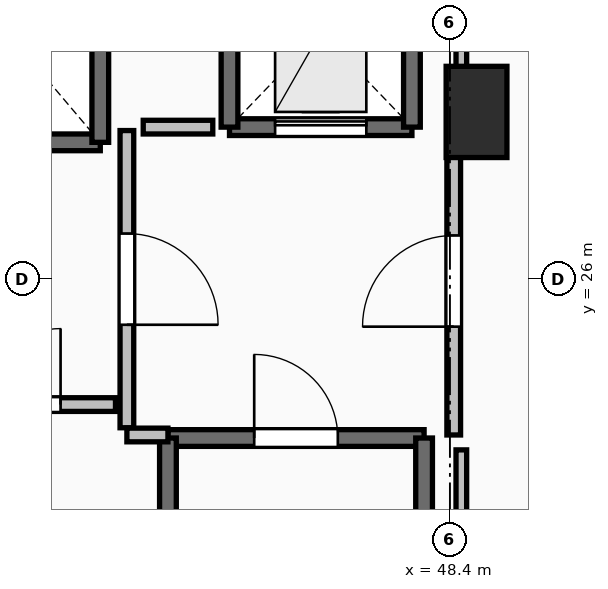
"""IFC4 building model, lengths in metres.
Left out: names, types, materials, properties, quantities, classifications, styles, units other than length and angle.
Written with IfcOpenShell. Run it as: python <this file> out.ifc"""

import sys

from ifc_helpers import new_model, si_unit, direction, frame, frame_2d, origin, origin_2d, place, context, subcontext, project, spatial, rectangle, extrude, element, fill, save


model = new_model("IFC4")
c1 = context("Model", 3, precision=1e-05, world=origin(), true_north=direction((0.0, 1.0)))
c2 = subcontext(c1, "Body", "Model", "MODEL_VIEW")
j1 = project(units=[si_unit("LENGTHUNIT", "METRE"), si_unit("PLANEANGLEUNIT", "RADIAN")], contexts=[c1])
p1 = place(None, origin())
s1 = spatial("IfcSite", under=j1, at=p1, CompositionType="ELEMENT")
p2 = place(p1, origin())
s2 = spatial("IfcBuilding", under=s1, at=p2, CompositionType="ELEMENT")
p3 = place(p2, frame((0.0, 0.0, 129.1)))
s3 = spatial("IfcBuildingStorey", under=s2, at=p3, CompositionType="ELEMENT", Elevation=129.1)
p4 = place(p3, frame((48.75, 28.2, 0.0), z_axis=(0.0, 0.0, 1.0), x_axis=(1.0, 0.0, 0.0)))
e1 = element("IfcColumn", 1, at=p4, inside=s3, PredefinedType="PILASTER", context=c2, shape_type="SweptSolid", body=[
    extrude(rectangle(XDim=0.8, YDim=1.2, at=origin_2d()), origin(), (0.0, 0.0, 1.0), 3.5),
])
p5 = place(p3, frame((44.69, 23.91, 0.0), z_axis=(0.0, 0.0, 1.0), x_axis=(1.0, 0.0, 0.0)))
e2 = element("IfcWall", 2, at=p5, inside=s3, PredefinedType="SOLIDWALL", context=c2, shape_type="SweptSolid", body=[
    extrude(rectangle(XDim=3.37, YDim=0.22, at=frame_2d((1.685, 0.0))), origin(), (0.0, 0.0, 1.0), 3.24),
])
p6 = place(p5, frame((1.135, 0.0, 0.0)))
e3 = element("IfcOpeningElement", 3, at=p6, cuts=e2, PredefinedType="OPENING", context=c2, shape_type="SweptSolid", body=[
    extrude(rectangle(XDim=1.1, YDim=2.15, at=frame_2d((0.55, 1.075))), frame((0.0, 0.125, 0.0), z_axis=(0.0, -1.0, 0.0), x_axis=(1.0, 0.0, 0.0)), (0.0, 0.0, 1.0), 0.25),
])
for number, where, z_axis, x_axis in (
    (4, (48.06, 23.91, 0.0), (0.0, 0.0, 1.0), (0.0, -1.0, 0.0)),
    (5, (44.69, 16.49, 0.0), (0.0, 0.0, 1.0), (0.0, 1.0, 0.0)),
):
    element("IfcWall", number, at=place(p3, frame(where, z_axis=z_axis, x_axis=x_axis)), inside=s3, PredefinedType="SOLIDWALL", context=c2, shape_type="SweptSolid", body=[
        extrude(rectangle(XDim=7.42, YDim=0.22, at=frame_2d((3.71, 0.0))), origin(), (0.0, 0.0, 1.0), 3.24),
    ])
p7 = place(p3, frame((41.6, 27.8, 0.0), z_axis=(0.0, 0.0, 1.0), x_axis=(1.0, 0.0, 0.0)))
e6 = element("IfcWall", 6, at=p7, inside=s3, PredefinedType="SOLIDWALL", context=c2, shape_type="SweptSolid", body=[
    extrude(rectangle(XDim=2.2, YDim=0.22, at=frame_2d((1.1, 0.0))), origin(), (0.0, 0.0, 1.0), 3.24),
])
p8 = place(p3, frame((43.8, 27.8, 0.0), z_axis=(0.0, 0.0, 1.0), x_axis=(0.0, 1.0, 0.0)))
e7 = element("IfcWall", 7, at=p8, inside=s3, PredefinedType="SOLIDWALL", context=c2, shape_type="SweptSolid", body=[
    extrude(rectangle(XDim=2.6, YDim=0.22, at=frame_2d((1.3, 0.0))), origin(), (0.0, 0.0, 1.0), 3.24),
])
p9 = place(p3, frame((45.5, 28.0, 0.0), z_axis=(0.0, 0.0, 1.0), x_axis=(1.0, 0.0, 0.0)))
e8 = element("IfcWall", 8, at=p9, inside=s3, PredefinedType="SHEAR", context=c2, shape_type="SweptSolid", body=[
    extrude(rectangle(XDim=2.4, YDim=0.22, at=frame_2d((1.2, 0.0))), origin(), (0.0, 0.0, 1.0), 3.24),
])
p10 = place(p9, frame((0.6, 0.0, 0.0)))
e9 = element("IfcOpeningElement", 9, at=p10, cuts=e8, PredefinedType="OPENING", context=c2, shape_type="SweptSolid", body=[
    extrude(rectangle(XDim=1.2, YDim=2.2, at=frame_2d((0.6, 1.1))), frame((0.0, 0.125, 0.0), z_axis=(0.0, -1.0, 0.0), x_axis=(1.0, 0.0, 0.0)), (0.0, 0.0, 1.0), 0.25),
])
for number, where, z_axis, x_axis in (
    (10, (47.9, 28.0, 0.0), (0.0, 0.0, 1.0), (0.0, 1.0, 0.0)),
    (11, (45.5, 30.5, 0.0), (0.0, 0.0, 1.0), (0.0, -1.0, 0.0)),
):
    element("IfcWall", number, at=place(p3, frame(where, z_axis=z_axis, x_axis=x_axis)), inside=s3, PredefinedType="SHEAR", context=c2, shape_type="SweptSolid", body=[
        extrude(rectangle(XDim=2.5, YDim=0.22, at=frame_2d((1.25, 0.0))), origin(), (0.0, 0.0, 1.0), 3.24),
    ])
p11 = place(p3, frame((44.15, 27.955, 0.0), z_axis=(0.0, 0.0, 1.0), x_axis=(0.0, -1.0, 0.0)))
e12 = element("IfcWall", 12, at=p11, inside=s3, PredefinedType="PARTITIONING", context=c2, shape_type="SweptSolid", body=[
    extrude(rectangle(XDim=3.91, YDim=0.18, at=frame_2d((1.955, 0.0))), origin(), (0.0, 0.0, 1.0), 3.24),
])
p12 = place(p11, frame((1.355, 0.0, 0.0)))
e13 = element("IfcOpeningElement", 13, at=p12, cuts=e12, PredefinedType="OPENING", context=c2, shape_type="SweptSolid", body=[
    extrude(rectangle(XDim=1.2, YDim=2.15, at=frame_2d((0.6, 1.075))), frame((0.0, 0.105, 0.0), z_axis=(0.0, -1.0, 0.0), x_axis=(1.0, 0.0, 0.0)), (0.0, 0.0, 1.0), 0.21),
])
p13 = place(p3, frame((44.15, 23.95, 0.0), z_axis=(0.0, 0.0, 1.0), x_axis=(1.0, 0.0, 0.0)))
e14 = element("IfcWall", 14, at=p13, inside=s3, PredefinedType="PARTITIONING", context=c2, shape_type="SweptSolid", body=[
    extrude(rectangle(XDim=0.54, YDim=0.18, at=frame_2d((0.27, 0.0))), origin(), (0.0, 0.0, 1.0), 3.24),
])
p14 = place(p3, frame((48.45, 23.95, 0.0), z_axis=(0.0, 0.0, 1.0), x_axis=(0.0, 1.0, 0.0)))
e15 = element("IfcWall", 15, at=p14, inside=s3, PredefinedType="PARTITIONING", context=c2, shape_type="SweptSolid", body=[
    extrude(rectangle(XDim=4.05, YDim=0.18, at=frame_2d((2.025, 0.0))), origin(), (0.0, 0.0, 1.0), 3.24),
])
p15 = place(p14, frame((1.425, 0.0, 0.0)))
e16 = element("IfcOpeningElement", 16, at=p15, cuts=e15, PredefinedType="OPENING", context=c2, shape_type="SweptSolid", body=[
    extrude(rectangle(XDim=1.2, YDim=2.15, at=frame_2d((0.6, 1.075))), frame((0.0, 0.105, 0.0), z_axis=(0.0, -1.0, 0.0), x_axis=(1.0, 0.0, 0.0)), (0.0, 0.0, 1.0), 0.21),
])
p16 = place(p3, frame((41.555, 24.35, 0.0), z_axis=(0.0, 0.0, 1.0), x_axis=(1.0, 0.0, 0.0)))
e17 = element("IfcWall", 17, at=p16, inside=s3, PredefinedType="PARTITIONING", context=c2, shape_type="SweptSolid", body=[
    extrude(rectangle(XDim=2.445, YDim=0.18, at=frame_2d((1.223, 0.0))), origin(), (0.0, 0.0, 1.0), 3.24),
])
p17 = place(p16, frame((0.722, 0.0, 0.0)))
e18 = element("IfcOpeningElement", 18, at=p17, cuts=e17, PredefinedType="OPENING", context=c2, shape_type="SweptSolid", body=[
    extrude(rectangle(XDim=1.0, YDim=2.15, at=frame_2d((0.5, 1.075))), frame((0.0, 0.105, 0.0), z_axis=(0.0, -1.0, 0.0), x_axis=(1.0, 0.0, 0.0)), (0.0, 0.0, 1.0), 0.21),
])
p18 = place(p3, frame((45.28, 28.0, 0.0), z_axis=(0.0, 0.0, 1.0), x_axis=(-1.0, 0.0, 0.0)))
e19 = element("IfcWall", 19, at=p18, inside=s3, PredefinedType="PARTITIONING", context=c2, shape_type="SweptSolid", body=[
    extrude(rectangle(XDim=0.915, YDim=0.18, at=frame_2d((0.458, 0.0))), origin(), (0.0, 0.0, 1.0), 3.24),
])
p19 = place(p3, frame((48.55, 28.196, 0.0), z_axis=(0.0, 0.0, 1.0), x_axis=(0.0, 1.0, 0.0)))
e20 = element("IfcWall", 20, at=p19, inside=s3, PredefinedType="PARTITIONING", context=c2, shape_type="SweptSolid", body=[
    extrude(rectangle(XDim=5.254, YDim=0.14, at=frame_2d((2.627, 0.0))), origin(), (0.0, 0.0, 1.0), 2.432),
])
p20 = place(p3, frame((48.55, 16.24, 0.0), z_axis=(0.0, 0.0, 1.0), x_axis=(0.0, 1.0, 0.0)))
e21 = element("IfcWall", 21, at=p20, inside=s3, PredefinedType="PARTITIONING", context=c2, shape_type="SweptSolid", body=[
    extrude(rectangle(XDim=7.514, YDim=0.14, at=frame_2d((3.757, 0.0))), origin(), (0.0, 0.0, 1.0), 2.432),
])
p21 = place(p6, origin())
e22 = element("IfcDoor", 22, at=p21, inside=s3, OperationType="SINGLE_SWING_LEFT", PredefinedType="DOOR", context=c2, shape_type="SweptSolid", body=[
    extrude(rectangle(XDim=1.1, YDim=2.15, at=frame_2d((0.55, 1.075))), frame((0.0, 0.025, 0.0), z_axis=(0.0, -1.0, 0.0), x_axis=(1.0, 0.0, 0.0)), (0.0, 0.0, 1.0), 0.05),
])
fill(e3, e22)
p22 = place(p10, origin())
e23 = element("IfcDoor", 23, at=p22, inside=s3, OperationType="SLIDING_TO_LEFT", PredefinedType="DOOR", context=c2, shape_type="SweptSolid", body=[
    extrude(rectangle(XDim=1.2, YDim=2.2, at=frame_2d((0.6, 1.1))), frame((0.0, 0.025, 0.0), z_axis=(0.0, -1.0, 0.0), x_axis=(1.0, 0.0, 0.0)), (0.0, 0.0, 1.0), 0.05),
])
fill(e9, e23)
p23 = place(p12, origin())
e24 = element("IfcDoor", 24, at=p23, inside=s3, OperationType="SINGLE_SWING_RIGHT", PredefinedType="DOOR", context=c2, shape_type="SweptSolid", body=[
    extrude(rectangle(XDim=1.2, YDim=2.15, at=frame_2d((0.6, 1.075))), frame((0.0, 0.025, 0.0), z_axis=(0.0, -1.0, 0.0), x_axis=(1.0, 0.0, 0.0)), (0.0, 0.0, 1.0), 0.05),
])
fill(e13, e24)
p24 = place(p15, origin())
e25 = element("IfcDoor", 25, at=p24, inside=s3, OperationType="SINGLE_SWING_LEFT", PredefinedType="DOOR", context=c2, shape_type="SweptSolid", body=[
    extrude(rectangle(XDim=1.2, YDim=2.15, at=frame_2d((0.6, 1.075))), frame((0.0, 0.025, 0.0), z_axis=(0.0, -1.0, 0.0), x_axis=(1.0, 0.0, 0.0)), (0.0, 0.0, 1.0), 0.05),
])
fill(e16, e25)
p25 = place(p17, origin())
e26 = element("IfcDoor", 26, at=p25, inside=s3, OperationType="SINGLE_SWING_RIGHT", PredefinedType="DOOR", context=c2, shape_type="SweptSolid", body=[
    extrude(rectangle(XDim=1.0, YDim=2.15, at=frame_2d((0.5, 1.075))), frame((0.0, 0.025, 0.0), z_axis=(0.0, -1.0, 0.0), x_axis=(1.0, 0.0, 0.0)), (0.0, 0.0, 1.0), 0.05),
])
fill(e18, e26)
save(model, sys.argv[1])
